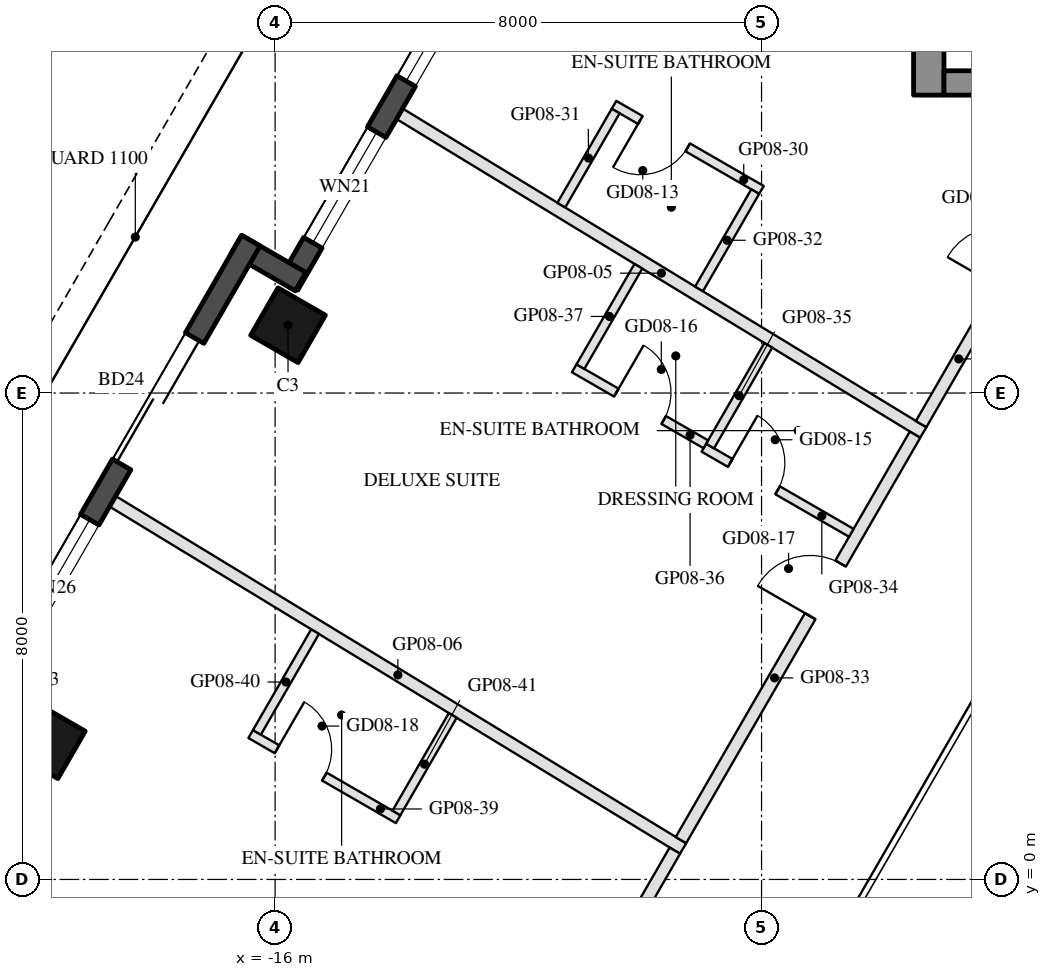
"""IFC4 building model, lengths in metres.
Left out: names, types, materials, properties, quantities, classifications, styles, units other than length and angle.
Written with IfcOpenShell. Run it as: python <this file> out.ifc"""

import sys

from ifc_helpers import new_model, si_unit, direction, frame, frame_2d, origin, origin_2d, place, context, subcontext, project, spatial, rectangle, hollow_rectangle, extrude, element, fill, save


model = new_model("IFC4")
c1 = context("Model", 3, precision=1e-05, world=origin(), true_north=direction((0.0, 1.0)))
c2 = subcontext(c1, "Body", "Model", "MODEL_VIEW")
j1 = project(units=[si_unit("LENGTHUNIT", "METRE"), si_unit("PLANEANGLEUNIT", "RADIAN")], contexts=[c1])
p1 = place(None, origin())
s1 = spatial("IfcSite", under=j1, at=p1, CompositionType="ELEMENT")
p2 = place(p1, origin())
s2 = spatial("IfcBuilding", under=s1, at=p2, CompositionType="ELEMENT")
p3 = place(p2, frame((0.0, 0.0, 105.7)))
s3 = spatial("IfcBuildingStorey", under=s2, at=p3, CompositionType="ELEMENT", Elevation=105.7)
for number, where, z_axis, x_axis in (
    (1, (-15.788, 9.115, 0.0), (0.0, 0.0, 1.0), (0.5, 0.866, 0.0)),
    (2, (-19.738, 2.273, 0.0), (0.0, 0.0, 1.0), (0.5, 0.866, 0.0)),
):
    element("IfcColumn", number, at=place(p3, frame(where, z_axis=z_axis, x_axis=x_axis)), inside=s3, PredefinedType="COLUMN", context=c2, shape_type="SweptSolid", body=[
        extrude(hollow_rectangle(XDim=0.9, YDim=0.9, WallThickness=0.04, at=origin_2d()), origin(), (0.0, 0.0, 1.0), 3.7),
    ])
p4 = place(p3, frame((-12.409, 15.617, 0.0), z_axis=(0.0, 0.0, 1.0), x_axis=(-0.500003597184, -0.866023326939, 0.0)))
e3 = element("IfcWall", 3, at=p4, inside=s3, PredefinedType="SOLIDWALL", context=c2, shape_type="SweptSolid", body=[
    extrude(rectangle(XDim=6.74, YDim=0.35, at=frame_2d((3.37, 0.0))), origin(), (0.0, 0.0, 1.0), 3.55),
])
p5 = place(p4, frame((0.77, 0.0, 0.3)))
e4 = element("IfcOpeningElement", 4, at=p5, cuts=e3, PredefinedType="OPENING", context=c2, shape_type="SweptSolid", body=[
    extrude(rectangle(XDim=2.1, YDim=2.65, at=frame_2d((1.05, 1.325))), frame((0.0, 0.185, 0.0), z_axis=(0.0, -1.0, 0.0), x_axis=(1.0, 0.0, 0.0)), (0.0, 0.0, 1.0), 0.37),
])
p6 = place(p4, frame((3.841, 0.0, 0.3)))
e5 = element("IfcOpeningElement", 5, at=p6, cuts=e3, PredefinedType="OPENING", context=c2, shape_type="SweptSolid", body=[
    extrude(rectangle(XDim=2.1, YDim=2.65, at=frame_2d((1.05, 1.325))), frame((0.0, 0.185, 0.0), z_axis=(0.0, -1.0, 0.0), x_axis=(1.0, 0.0, 0.0)), (0.0, 0.0, 1.0), 0.37),
])
p7 = place(p3, frame((-15.581, 9.833, 0.0), z_axis=(0.0, 0.0, 1.0), x_axis=(-0.866055662726, 0.499947586314, 0.0)))
e6 = element("IfcWall", 6, at=p7, inside=s3, PredefinedType="SOLIDWALL", context=c2, shape_type="SweptSolid", body=[
    extrude(rectangle(XDim=1.22, YDim=0.35, at=frame_2d((0.61, 0.0))), origin(), (0.0, 0.0, 1.0), 3.55),
])
p8 = place(p3, frame((-16.398, 10.507, 0.0), z_axis=(0.0, 0.0, 1.0), x_axis=(-0.499999142773, -0.866025898704, 0.0)))
e7 = element("IfcWall", 7, at=p8, inside=s3, PredefinedType="SOLIDWALL", context=c2, shape_type="SweptSolid", body=[
    extrude(rectangle(XDim=9.7, YDim=0.35, at=frame_2d((4.85, 0.0))), origin(), (0.0, 0.0, 1.0), 3.55),
])
p9 = place(p8, frame((1.85, 0.0, 0.0)))
e8 = element("IfcOpeningElement", 8, at=p9, cuts=e7, PredefinedType="OPENING", context=c2, shape_type="SweptSolid", body=[
    extrude(rectangle(XDim=2.4, YDim=2.4, at=frame_2d((1.2, 1.2))), frame((0.0, 0.185, 0.0), z_axis=(0.0, -1.0, 0.0), x_axis=(1.0, 0.0, 0.0)), (0.0, 0.0, 1.0), 0.37),
])
p10 = place(p8, frame((5.3, 0.0, 0.3)))
e9 = element("IfcOpeningElement", 9, at=p10, cuts=e7, PredefinedType="OPENING", context=c2, shape_type="SweptSolid", body=[
    extrude(rectangle(XDim=2.6, YDim=2.65, at=frame_2d((1.3, 1.325))), frame((0.0, 0.185, 0.0), z_axis=(0.0, -1.0, 0.0), x_axis=(1.0, 0.0, 0.0)), (0.0, 0.0, 1.0), 0.37),
])
p11 = place(p3, frame((-5.25, 12.9, 0.0), z_axis=(0.0, 0.0, 1.0), x_axis=(0.0, 1.0, 0.0)))
e10 = element("IfcWall", 10, at=p11, inside=s3, PredefinedType="SHEAR", context=c2, shape_type="SweptSolid", body=[
    extrude(rectangle(XDim=14.837, YDim=0.5, at=frame_2d((7.418, 0.0))), origin(), (0.0, 0.0, 1.0), 3.5),
])
p12 = place(p3, frame((5.0, 13.1, 0.0), z_axis=(0.0, 0.0, 1.0), x_axis=(-1.0, 0.0, 0.0)))
e11 = element("IfcWall", 11, at=p12, inside=s3, PredefinedType="SHEAR", context=c2, shape_type="SweptSolid", body=[
    extrude(rectangle(XDim=10.0, YDim=0.4, at=frame_2d((5.0, 0.0))), origin(), (0.0, 0.0, 1.0), 3.5),
])
p13 = place(p12, frame((3.55, 0.0, 0.0)))
e12 = element("IfcOpeningElement", 12, at=p13, cuts=e11, PredefinedType="OPENING", context=c2, shape_type="SweptSolid", body=[
    extrude(rectangle(XDim=1.1, YDim=2.1, at=frame_2d((0.55, 1.05))), frame((0.0, 0.21, 0.0), z_axis=(0.0, -1.0, 0.0), x_axis=(1.0, 0.0, 0.0)), (0.0, 0.0, 1.0), 0.42),
])
p14 = place(p12, frame((5.85, 0.0, 0.0)))
e13 = element("IfcOpeningElement", 13, at=p14, cuts=e11, PredefinedType="OPENING", context=c2, shape_type="SweptSolid", body=[
    extrude(rectangle(XDim=1.4, YDim=2.1, at=frame_2d((0.7, 1.05))), frame((0.0, 0.21, 0.0), z_axis=(0.0, -1.0, 0.0), x_axis=(1.0, 0.0, 0.0)), (0.0, 0.0, 1.0), 0.42),
])
p15 = place(p3, frame((-13.953, 12.593, 0.0), z_axis=(0.0, 0.0, 1.0), x_axis=(0.854198088033, -0.519947715065, 0.0)))
e14 = element("IfcWall", 14, at=p15, inside=s3, PredefinedType="PARTITIONING", context=c2, shape_type="SweptSolid", body=[
    extrude(rectangle(XDim=10.083, YDim=0.2, at=frame_2d((5.041, 0.0))), origin(), (0.0, 0.0, 1.0), 2.95),
])
p16 = place(p3, frame((-18.672, 6.219, 0.0), z_axis=(0.0, 0.0, 1.0), x_axis=(0.854207998877, -0.519931432647, 0.0)))
e15 = element("IfcWall", 15, at=p16, inside=s3, PredefinedType="PARTITIONING", context=c2, shape_type="SweptSolid", body=[
    extrude(rectangle(XDim=10.983, YDim=0.2, at=frame_2d((5.492, 0.0))), origin(), (0.0, 0.0, 1.0), 2.95),
])
p17 = place(p3, frame((-5.376, 7.489, 0.0), z_axis=(0.0, 0.0, 1.0), x_axis=(0.499998977725, 0.866025993994, 0.0)))
e16 = element("IfcWall", 16, at=p17, inside=s3, PredefinedType="PARTITIONING", context=c2, shape_type="SweptSolid", body=[
    extrude(rectangle(XDim=6.19, YDim=0.2, at=frame_2d((3.095, 0.0))), origin(), (0.0, 0.0, 1.0), 2.95),
])
p18 = place(p17, frame((2.595, 0.0, 0.0)))
e17 = element("IfcOpeningElement", 17, at=p18, cuts=e16, PredefinedType="OPENING", context=c2, shape_type="SweptSolid", body=[
    extrude(rectangle(XDim=1.0, YDim=2.1, at=frame_2d((0.5, 1.05))), frame((0.0, 0.11, 0.0), z_axis=(0.0, -1.0, 0.0), x_axis=(1.0, 0.0, 0.0)), (0.0, 0.0, 1.0), 0.22),
])
p19 = place(p3, frame((-8.002, 11.34, 0.0), z_axis=(0.0, 0.0, 1.0), x_axis=(-0.865996816683, 0.500049511043, 0.0)))
e18 = element("IfcWall", 18, at=p19, inside=s3, PredefinedType="PARTITIONING", context=c2, shape_type="SweptSolid", body=[
    extrude(rectangle(XDim=2.8, YDim=0.15, at=frame_2d((1.4, 0.0))), origin(), (0.0, 0.0, 1.0), 3.55),
])
p20 = place(p19, frame((1.4, 0.0, 0.0)))
e19 = element("IfcOpeningElement", 19, at=p20, cuts=e18, PredefinedType="OPENING", context=c2, shape_type="SweptSolid", body=[
    extrude(rectangle(XDim=0.9, YDim=2.1, at=frame_2d((0.45, 1.05))), frame((0.0, 0.085, 0.0), z_axis=(0.0, -1.0, 0.0), x_axis=(1.0, 0.0, 0.0)), (0.0, 0.0, 1.0), 0.17),
])
p21 = place(p3, frame((-10.399, 12.638, 0.0), z_axis=(0.0, 0.0, 1.0), x_axis=(-0.499974788625, -0.866039959089, 0.0)))
e20 = element("IfcWall", 20, at=p21, inside=s3, PredefinedType="PARTITIONING", context=c2, shape_type="SweptSolid", body=[
    extrude(rectangle(XDim=1.787, YDim=0.15, at=frame_2d((0.893, 0.0))), origin(), (0.0, 0.0, 1.0), 2.95),
])
p22 = place(p3, frame((-8.104, 11.313, 0.0), z_axis=(0.0, 0.0, 1.0), x_axis=(-0.499989263917, -0.866031602176, 0.0)))
e21 = element("IfcWall", 21, at=p22, inside=s3, PredefinedType="PARTITIONING", context=c2, shape_type="SweptSolid", body=[
    extrude(rectangle(XDim=1.848, YDim=0.15, at=frame_2d((0.924, 0.0))), origin(), (0.0, 0.0, 1.0), 2.95),
])
p23 = place(p3, frame((-9.326, 0.647, 0.0), z_axis=(0.0, 0.0, 1.0), x_axis=(0.499982277793, 0.866035635464, 0.0)))
e22 = element("IfcWall", 22, at=p23, inside=s3, PredefinedType="PARTITIONING", context=c2, shape_type="SweptSolid", body=[
    extrude(rectangle(XDim=7.7, YDim=0.2, at=frame_2d((3.85, 0.0))), origin(), (0.0, 0.0, 1.0), 2.95),
])
p24 = place(p23, frame((4.252, 0.0, 0.0)))
e23 = element("IfcOpeningElement", 23, at=p24, cuts=e22, PredefinedType="OPENING", context=c2, shape_type="SweptSolid", body=[
    extrude(rectangle(XDim=1.0, YDim=2.1, at=frame_2d((0.5, 1.05))), frame((0.0, 0.11, 0.0), z_axis=(0.0, -1.0, 0.0), x_axis=(1.0, 0.0, 0.0)), (0.0, 0.0, 1.0), 0.22),
])
p25 = place(p3, frame((-8.948, 7.101, 0.0), z_axis=(0.0, 0.0, 1.0), x_axis=(0.866034573852, -0.49998411664, 0.0)))
e24 = element("IfcWall", 24, at=p25, inside=s3, PredefinedType="PARTITIONING", context=c2, shape_type="SweptSolid", body=[
    extrude(rectangle(XDim=2.8, YDim=0.15, at=frame_2d((1.4, 0.0))), origin(), (0.0, 0.0, 1.0), 3.55),
])
p26 = place(p25, frame((0.5, 0.0, 0.0)))
e25 = element("IfcOpeningElement", 25, at=p26, cuts=e24, PredefinedType="OPENING", context=c2, shape_type="SweptSolid", body=[
    extrude(rectangle(XDim=0.9, YDim=2.1, at=frame_2d((0.45, 1.05))), frame((0.0, 0.085, 0.0), z_axis=(0.0, -1.0, 0.0), x_axis=(1.0, 0.0, 0.0)), (0.0, 0.0, 1.0), 0.17),
])
p27 = place(p3, frame((-7.89, 8.785, 0.0), z_axis=(0.0, 0.0, 1.0), x_axis=(-0.499954417993, -0.866051718969, 0.0)))
e26 = element("IfcWall", 26, at=p27, inside=s3, PredefinedType="PARTITIONING", context=c2, shape_type="SweptSolid", body=[
    extrude(rectangle(XDim=1.913, YDim=0.15, at=frame_2d((0.957, 0.0))), origin(), (0.0, 0.0, 1.0), 3.55),
])
p28 = place(p3, frame((-11.081, 8.407, 0.0), z_axis=(0.0, 0.0, 1.0), x_axis=(0.866047370643, -0.499961950354, 0.0)))
e27 = element("IfcWall", 27, at=p28, inside=s3, PredefinedType="PARTITIONING", context=c2, shape_type="SweptSolid", body=[
    extrude(rectangle(XDim=2.5, YDim=0.15, at=frame_2d((1.25, 0.0))), origin(), (0.0, 0.0, 1.0), 3.55),
])
p29 = place(p28, frame((0.8, 0.0, 0.0)))
e28 = element("IfcOpeningElement", 28, at=p29, cuts=e27, PredefinedType="OPENING", context=c2, shape_type="SweptSolid", body=[
    extrude(rectangle(XDim=0.9, YDim=2.1, at=frame_2d((0.45, 1.05))), frame((0.0, 0.085, 0.0), z_axis=(0.0, -1.0, 0.0), x_axis=(1.0, 0.0, 0.0)), (0.0, 0.0, 1.0), 0.17),
])
p30 = place(p3, frame((-10.026, 10.085, 0.0), z_axis=(0.0, 0.0, 1.0), x_axis=(-0.49999591573, -0.866027761826, 0.0)))
e29 = element("IfcWall", 29, at=p30, inside=s3, PredefinedType="PARTITIONING", context=c2, shape_type="SweptSolid", body=[
    extrude(rectangle(XDim=1.906, YDim=0.15, at=frame_2d((0.953, 0.0))), origin(), (0.0, 0.0, 1.0), 3.55),
])
p31 = place(p3, frame((-12.269, -4.45, 0.0), z_axis=(0.0, 0.0, 1.0), x_axis=(0.50001360338, 0.866017549727, 0.0)))
e30 = element("IfcWall", 30, at=p31, inside=s3, PredefinedType="PARTITIONING", context=c2, shape_type="SweptSolid", body=[
    extrude(rectangle(XDim=5.686, YDim=0.2, at=frame_2d((2.843, 0.0))), origin(), (0.0, 0.0, 1.0), 2.95),
])
p32 = place(p31, frame((2.343, 0.0, 0.0)))
e31 = element("IfcOpeningElement", 31, at=p32, cuts=e30, PredefinedType="OPENING", context=c2, shape_type="SweptSolid", body=[
    extrude(rectangle(XDim=1.0, YDim=2.1, at=frame_2d((0.5, 1.05))), frame((0.0, 0.11, 0.0), z_axis=(0.0, -1.0, 0.0), x_axis=(1.0, 0.0, 0.0)), (0.0, 0.0, 1.0), 0.22),
])
p33 = place(p3, frame((-16.402, 2.391, 0.0), z_axis=(0.0, 0.0, 1.0), x_axis=(0.866018616679, -0.500011755427, 0.0)))
e32 = element("IfcWall", 32, at=p33, inside=s3, PredefinedType="PARTITIONING", context=c2, shape_type="SweptSolid", body=[
    extrude(rectangle(XDim=2.8, YDim=0.15, at=frame_2d((1.4, 0.0))), origin(), (0.0, 0.0, 1.0), 3.55),
])
p34 = place(p33, frame((0.5, 0.0, 0.0)))
e33 = element("IfcOpeningElement", 33, at=p34, cuts=e32, PredefinedType="OPENING", context=c2, shape_type="SweptSolid", body=[
    extrude(rectangle(XDim=0.9, YDim=2.1, at=frame_2d((0.45, 1.05))), frame((0.0, 0.085, 0.0), z_axis=(0.0, -1.0, 0.0), x_axis=(1.0, 0.0, 0.0)), (0.0, 0.0, 1.0), 0.17),
])
p35 = place(p3, frame((-15.343, 4.076, 0.0), z_axis=(0.0, 0.0, 1.0), x_axis=(-0.499954417993, -0.866051718969, 0.0)))
e34 = element("IfcWall", 34, at=p35, inside=s3, PredefinedType="PARTITIONING", context=c2, shape_type="SweptSolid", body=[
    extrude(rectangle(XDim=1.913, YDim=0.15, at=frame_2d((0.957, 0.0))), origin(), (0.0, 0.0, 1.0), 3.55),
])
p36 = place(p3, frame((-13.079, 2.698, 0.0), z_axis=(0.0, 0.0, 1.0), x_axis=(-0.499939294285, -0.866060449409, 0.0)))
e35 = element("IfcWall", 35, at=p36, inside=s3, PredefinedType="PARTITIONING", context=c2, shape_type="SweptSolid", body=[
    extrude(rectangle(XDim=1.852, YDim=0.15, at=frame_2d((0.926, 0.0))), origin(), (0.0, 0.0, 1.0), 3.55),
])
p37 = place(p5, origin())
e36 = element("IfcWindow", 36, at=p37, inside=s3, PartitioningType="SINGLE_PANEL", PredefinedType="WINDOW", context=c2, shape_type="SweptSolid", body=[
    extrude(rectangle(XDim=2.1, YDim=2.65, at=frame_2d((1.05, 1.325))), frame((0.0, 0.03, 0.0), z_axis=(0.0, -1.0, 0.0), x_axis=(1.0, 0.0, 0.0)), (0.0, 0.0, 1.0), 0.06),
])
fill(e4, e36)
p38 = place(p6, origin())
e37 = element("IfcWindow", 37, at=p38, inside=s3, PartitioningType="SINGLE_PANEL", PredefinedType="WINDOW", context=c2, shape_type="SweptSolid", body=[
    extrude(rectangle(XDim=2.1, YDim=2.65, at=frame_2d((1.05, 1.325))), frame((0.0, 0.03, 0.0), z_axis=(0.0, -1.0, 0.0), x_axis=(1.0, 0.0, 0.0)), (0.0, 0.0, 1.0), 0.06),
])
fill(e5, e37)
p39 = place(p9, frame((2.4, 0.0, 0.0), z_axis=(0.0, 0.0, 1.0), x_axis=(-1.0, 0.0, 0.0)))
e38 = element("IfcDoor", 38, at=p39, inside=s3, OperationType="SLIDING_TO_LEFT", PredefinedType="DOOR", context=c2, shape_type="SweptSolid", body=[
    extrude(rectangle(XDim=2.4, YDim=2.4, at=frame_2d((1.2, 1.2))), frame((0.0, 0.025, 0.0), z_axis=(0.0, -1.0, 0.0), x_axis=(1.0, 0.0, 0.0)), (0.0, 0.0, 1.0), 0.05),
])
fill(e8, e38)
p40 = place(p10, origin())
e39 = element("IfcWindow", 39, at=p40, inside=s3, PartitioningType="SINGLE_PANEL", PredefinedType="WINDOW", context=c2, shape_type="SweptSolid", body=[
    extrude(rectangle(XDim=2.6, YDim=2.65, at=frame_2d((1.3, 1.325))), frame((0.0, 0.03, 0.0), z_axis=(0.0, -1.0, 0.0), x_axis=(1.0, 0.0, 0.0)), (0.0, 0.0, 1.0), 0.06),
])
fill(e9, e39)
p41 = place(p20, origin())
e40 = element("IfcDoor", 40, at=p41, inside=s3, OperationType="SINGLE_SWING_RIGHT", PredefinedType="DOOR", context=c2, shape_type="SweptSolid", body=[
    extrude(rectangle(XDim=0.9, YDim=2.1, at=frame_2d((0.45, 1.05))), frame((0.0, 0.025, 0.0), z_axis=(0.0, -1.0, 0.0), x_axis=(1.0, 0.0, 0.0)), (0.0, 0.0, 1.0), 0.05),
])
fill(e19, e40)
p42 = place(p26, origin())
e41 = element("IfcDoor", 41, at=p42, inside=s3, OperationType="SINGLE_SWING_LEFT", PredefinedType="DOOR", context=c2, shape_type="SweptSolid", body=[
    extrude(rectangle(XDim=0.9, YDim=2.1, at=frame_2d((0.45, 1.05))), frame((0.0, 0.025, 0.0), z_axis=(0.0, -1.0, 0.0), x_axis=(1.0, 0.0, 0.0)), (0.0, 0.0, 1.0), 0.05),
])
fill(e25, e41)
p43 = place(p29, origin())
e42 = element("IfcDoor", 42, at=p43, inside=s3, OperationType="SINGLE_SWING_LEFT", PredefinedType="DOOR", context=c2, shape_type="SweptSolid", body=[
    extrude(rectangle(XDim=0.9, YDim=2.1, at=frame_2d((0.45, 1.05))), frame((0.0, 0.025, 0.0), z_axis=(0.0, -1.0, 0.0), x_axis=(1.0, 0.0, 0.0)), (0.0, 0.0, 1.0), 0.05),
])
fill(e28, e42)
p44 = place(p24, origin())
e43 = element("IfcDoor", 43, at=p44, inside=s3, OperationType="SINGLE_SWING_LEFT", PredefinedType="DOOR", context=c2, shape_type="SweptSolid", body=[
    extrude(rectangle(XDim=1.0, YDim=2.1, at=frame_2d((0.5, 1.05))), frame((0.0, 0.025, 0.0), z_axis=(0.0, -1.0, 0.0), x_axis=(1.0, 0.0, 0.0)), (0.0, 0.0, 1.0), 0.05),
])
fill(e23, e43)
p45 = place(p34, origin())
e44 = element("IfcDoor", 44, at=p45, inside=s3, OperationType="SINGLE_SWING_LEFT", PredefinedType="DOOR", context=c2, shape_type="SweptSolid", body=[
    extrude(rectangle(XDim=0.9, YDim=2.1, at=frame_2d((0.45, 1.05))), frame((0.0, 0.025, 0.0), z_axis=(0.0, -1.0, 0.0), x_axis=(1.0, 0.0, 0.0)), (0.0, 0.0, 1.0), 0.05),
])
fill(e33, e44)
save(model, sys.argv[1])
